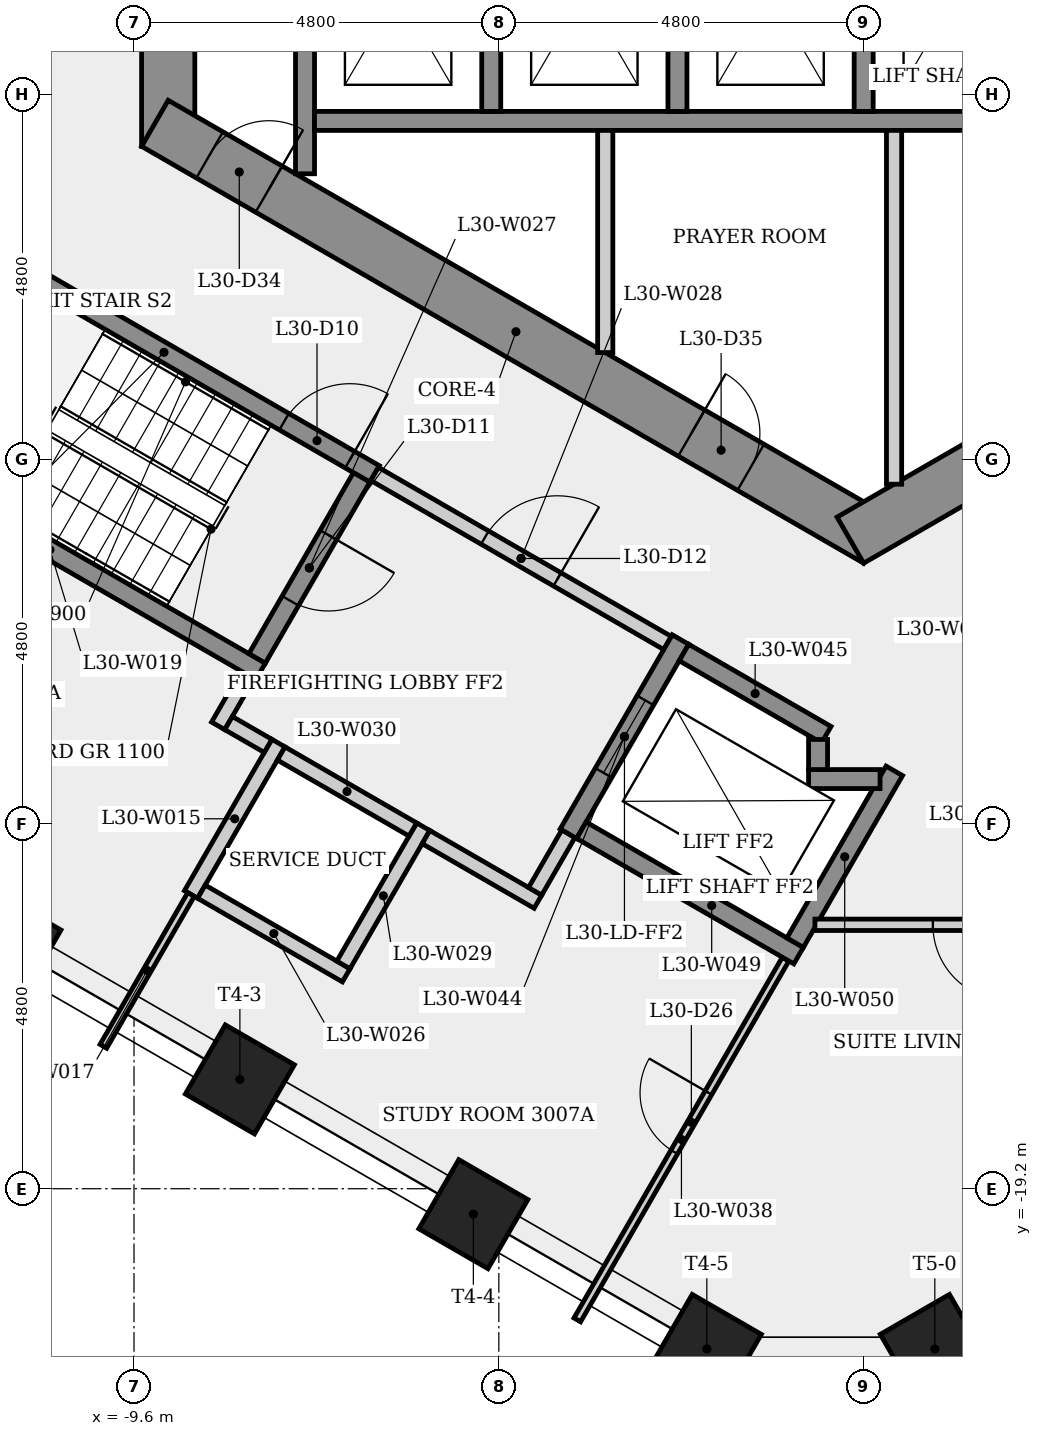
"""IFC4 building model, lengths in metres.
Left out: names, types, materials, properties, quantities, classifications, styles, units other than length and angle.
Written with IfcOpenShell. Run it as: python <this file> out.ifc"""

import sys

from ifc_helpers import new_model, si_unit, direction, frame, frame_2d, origin, origin_2d, place, context, subcontext, project, spatial, rectangle, extrude, element, fill, save


model = new_model("IFC4")
c1 = context("Model", 3, precision=1e-05, world=origin(), true_north=direction((0.0, 1.0)))
c2 = subcontext(c1, "Body", "Model", "MODEL_VIEW")
j1 = project(units=[si_unit("LENGTHUNIT", "METRE"), si_unit("PLANEANGLEUNIT", "RADIAN")], contexts=[c1])
p1 = place(None, origin())
s1 = spatial("IfcSite", under=j1, at=p1, CompositionType="ELEMENT")
p2 = place(p1, origin())
s2 = spatial("IfcBuilding", under=s1, at=p2, CompositionType="ELEMENT")
p3 = place(p2, frame((0.0, 0.0, 113.7)))
s3 = spatial("IfcBuildingStorey", under=s2, at=p3, CompositionType="ELEMENT", Elevation=113.7)
p4 = place(p3, frame((-9.15, 5.485, 0.0), z_axis=(0.0, 0.0, 1.0), x_axis=(0.0, -1.0, 0.0)))
e1 = element("IfcWall", 1, at=p4, inside=s3, PredefinedType="SHEAR", context=c2, shape_type="SweptSolid", body=[
    extrude(rectangle(XDim=10.97, YDim=0.7, at=frame_2d((5.485, 0.0))), origin(), (0.0, 0.0, 1.0), 3.4),
])
p5 = place(p4, frame((4.685, 0.0, 0.0)))
e2 = element("IfcOpeningElement", 2, at=p5, cuts=e1, PredefinedType="OPENING", context=c2, shape_type="SweptSolid", body=[
    extrude(rectangle(XDim=1.6, YDim=2.1, at=frame_2d((0.8, 1.05))), frame((0.0, 0.36, 0.0), z_axis=(0.0, -1.0, 0.0), x_axis=(1.0, 0.0, 0.0)), (0.0, 0.0, 1.0), 0.72),
])
p6 = place(p3, frame((-9.325, -5.182, 0.0), z_axis=(0.0, 0.0, 1.0), x_axis=(0.866023993627, -0.500002442456, 0.0)))
e3 = element("IfcWall", 3, at=p6, inside=s3, PredefinedType="SHEAR", context=c2, shape_type="SweptSolid", body=[
    extrude(rectangle(XDim=10.97, YDim=0.7, at=frame_2d((5.485, 0.0))), origin(), (0.0, 0.0, 1.0), 3.4),
])
p7 = place(p6, frame((0.832, 0.0, 0.0)))
e4 = element("IfcOpeningElement", 4, at=p7, cuts=e3, PredefinedType="OPENING", context=c2, shape_type="SweptSolid", body=[
    extrude(rectangle(XDim=0.9, YDim=2.1, at=frame_2d((0.45, 1.05))), frame((0.0, 0.36, 0.0), z_axis=(0.0, -1.0, 0.0), x_axis=(1.0, 0.0, 0.0)), (0.0, 0.0, 1.0), 0.72),
])
p8 = place(p6, frame((8.152, 0.0, 0.0)))
e5 = element("IfcOpeningElement", 5, at=p8, cuts=e3, PredefinedType="OPENING", context=c2, shape_type="SweptSolid", body=[
    extrude(rectangle(XDim=0.9, YDim=2.1, at=frame_2d((0.45, 1.05))), frame((0.0, 0.36, 0.0), z_axis=(0.0, -1.0, 0.0), x_axis=(1.0, 0.0, 0.0)), (0.0, 0.0, 1.0), 0.72),
])
p9 = place(p3, frame((-0.175, -10.667, 0.0), z_axis=(0.0, 0.0, 1.0), x_axis=(0.866023993627, 0.500002442456, 0.0)))
e6 = element("IfcWall", 6, at=p9, inside=s3, PredefinedType="SHEAR", context=c2, shape_type="SweptSolid", body=[
    extrude(rectangle(XDim=10.97, YDim=0.7, at=frame_2d((5.485, 0.0))), origin(), (0.0, 0.0, 1.0), 3.4),
])
p10 = place(p9, frame((6.906, 0.0, 0.0)))
e7 = element("IfcOpeningElement", 7, at=p10, cuts=e6, PredefinedType="OPENING", context=c2, shape_type="SweptSolid", body=[
    extrude(rectangle(XDim=0.9, YDim=2.1, at=frame_2d((0.45, 1.05))), frame((0.0, 0.36, 0.0), z_axis=(0.0, -1.0, 0.0), x_axis=(1.0, 0.0, 0.0)), (0.0, 0.0, 1.0), 0.72),
])
for number, where, z_axis, x_axis in (
    (8, (-11.279, -15.988, 0.0), (0.0, 0.0, 1.0), (-0.5, -0.866, 0.0)),
    (9, (-8.207, -17.762, 0.0), (0.0, 0.0, 1.0), (-0.5, -0.866, 0.0)),
    (10, (-5.135, -19.535, 0.0), (0.0, 0.0, 1.0), (-0.5, -0.866, 0.0)),
    (11, (-2.064, -21.308, 0.0), (0.0, 0.0, 1.0), (-0.5, -0.866, 0.0)),
    (12, (0.936, -21.308, 0.0), (0.0, 0.0, 1.0), (0.5, -0.866, 0.0)),
):
    element("IfcColumn", number, at=place(p3, frame(where, z_axis=z_axis, x_axis=x_axis)), inside=s3, PredefinedType="COLUMN", context=c2, shape_type="SweptSolid", body=[
        extrude(rectangle(XDim=1.05, YDim=1.05, at=origin_2d()), origin(), (0.0, 0.0, 1.0), 3.4),
    ])
p11 = place(p3, frame((-11.977, -6.595, 0.0), z_axis=(0.0, 0.0, 1.0), x_axis=(0.866025499775, -0.499999833739, 0.0)))
e13 = element("IfcWall", 13, at=p11, inside=s3, PredefinedType="SHEAR", context=c2, shape_type="SweptSolid", body=[
    extrude(rectangle(XDim=6.4, YDim=0.25, at=frame_2d((3.2, 0.0))), origin(), (0.0, 0.0, 1.0), 3.05),
])
p12 = place(p11, frame((5.025, 0.0, 0.0)))
e14 = element("IfcOpeningElement", 14, at=p12, cuts=e13, PredefinedType="OPENING", context=c2, shape_type="SweptSolid", body=[
    extrude(rectangle(XDim=1.0, YDim=2.1, at=frame_2d((0.5, 1.05))), frame((0.0, 0.135, 0.0), z_axis=(0.0, -1.0, 0.0), x_axis=(1.0, 0.0, 0.0)), (0.0, 0.0, 1.0), 0.27),
])
p13 = place(p3, frame((-8.85, -15.329, 0.0), z_axis=(0.0, 0.0, 1.0), x_axis=(0.500077740698, 0.865980515519, 0.0)))
e15 = element("IfcWall", 15, at=p13, inside=s3, PredefinedType="PLUMBINGWALL", context=c2, shape_type="SweptSolid", body=[
    extrude(rectangle(XDim=2.3, YDim=0.2, at=frame_2d((1.15, 0.0))), origin(), (0.0, 0.0, 1.0), 3.05),
])
p14 = place(p3, frame((-8.85, -15.329, 0.0), z_axis=(0.0, 0.0, 1.0), x_axis=(-0.500009533716, -0.866019899421, 0.0)))
e16 = element("IfcWall", 16, at=p14, inside=s3, PredefinedType="PARTITIONING", context=c2, shape_type="SweptSolid", body=[
    extrude(rectangle(XDim=2.307, YDim=0.1, at=frame_2d((1.153, 0.0))), origin(), (0.0, 0.0, 1.0), 3.05),
])
p15 = place(p3, frame((-8.493, -13.11, 0.0), z_axis=(0.0, 0.0, 1.0), x_axis=(0.500067724834, 0.865986299303, 0.0)))
e17 = element("IfcWall", 17, at=p15, inside=s3, PredefinedType="PARTITIONING", context=c2, shape_type="SweptSolid", body=[
    extrude(rectangle(XDim=0.775, YDim=0.2, at=frame_2d((0.388, 0.0))), origin(), (0.0, 0.0, 1.0), 3.05),
])
p16 = place(p3, frame((-7.935, -12.393, 0.0), z_axis=(0.0, 0.0, 1.0), x_axis=(-0.866025499775, 0.499999833739, 0.0)))
e18 = element("IfcWall", 18, at=p16, inside=s3, PredefinedType="SHEAR", context=c2, shape_type="SweptSolid", body=[
    extrude(rectangle(XDim=6.4, YDim=0.25, at=frame_2d((3.2, 0.0))), origin(), (0.0, 0.0, 1.0), 3.05),
])
p17 = place(p3, frame((-7.836, -13.373, 0.0), z_axis=(0.0, 0.0, 1.0), x_axis=(-0.866232998003, 0.499640263761, 0.0)))
e19 = element("IfcWall", 19, at=p17, inside=s3, PredefinedType="PARTITIONING", context=c2, shape_type="SweptSolid", body=[
    extrude(rectangle(XDim=0.6, YDim=0.2, at=frame_2d((0.3, 0.0))), origin(), (0.0, 0.0, 1.0), 3.05),
])
p18 = place(p3, frame((-7.35, -5.846, 0.0), z_axis=(0.0, 0.0, 1.0), x_axis=(0.0, 1.0, 0.0)))
e20 = element("IfcWall", 20, at=p18, inside=s3, PredefinedType="SHEAR", context=c2, shape_type="SweptSolid", body=[
    extrude(rectangle(XDim=4.171, YDim=0.25, at=frame_2d((2.085, 0.0))), origin(), (0.0, 0.0, 1.0), 3.05),
])
p19 = place(p3, frame((-6.808, -16.392, 0.0), z_axis=(0.0, 0.0, 1.0), x_axis=(-0.866008176907, 0.50002983664, 0.0)))
e21 = element("IfcWall", 21, at=p19, inside=s3, PredefinedType="PLUMBINGWALL", context=c2, shape_type="SweptSolid", body=[
    extrude(rectangle(XDim=2.2, YDim=0.2, at=frame_2d((1.1, 0.0))), origin(), (0.0, 0.0, 1.0), 3.05),
])
p20 = place(p3, frame((-6.605, -9.841, 0.0), z_axis=(0.0, 0.0, 1.0), x_axis=(-0.499996545922, -0.866027397988, 0.0)))
e22 = element("IfcWall", 22, at=p20, inside=s3, PredefinedType="SHEAR", context=c2, shape_type="SweptSolid", body=[
    extrude(rectangle(XDim=2.75, YDim=0.25, at=frame_2d((1.375, 0.0))), origin(), (0.0, 0.0, 1.0), 3.05),
])
p21 = place(p20, frame((0.875, 0.0, 0.0)))
e23 = element("IfcOpeningElement", 23, at=p21, cuts=e22, PredefinedType="OPENING", context=c2, shape_type="SweptSolid", body=[
    extrude(rectangle(XDim=1.0, YDim=2.1, at=frame_2d((0.5, 1.05))), frame((0.0, 0.135, 0.0), z_axis=(0.0, -1.0, 0.0), x_axis=(1.0, 0.0, 0.0)), (0.0, 0.0, 1.0), 0.27),
])
p22 = place(p3, frame((-6.435, -9.795, 0.0), z_axis=(0.0, 0.0, 1.0), x_axis=(0.866012907634, -0.500021643343, 0.0)))
e24 = element("IfcWall", 24, at=p22, inside=s3, PredefinedType="PARTITIONING", context=c2, shape_type="SweptSolid", body=[
    extrude(rectangle(XDim=4.45, YDim=0.2, at=frame_2d((2.225, 0.0))), origin(), (0.0, 0.0, 1.0), 3.05),
])
p23 = place(p22, frame((1.675, 0.0, 0.0)))
e25 = element("IfcOpeningElement", 25, at=p23, cuts=e24, PredefinedType="OPENING", context=c2, shape_type="SweptSolid", body=[
    extrude(rectangle(XDim=1.1, YDim=2.1, at=frame_2d((0.55, 1.05))), frame((0.0, 0.11, 0.0), z_axis=(0.0, -1.0, 0.0), x_axis=(1.0, 0.0, 0.0)), (0.0, 0.0, 1.0), 0.22),
])
p24 = place(p3, frame((-5.795, -14.437, 0.0), z_axis=(0.0, 0.0, 1.0), x_axis=(-0.500027713859, -0.866009402589, 0.0)))
e26 = element("IfcWall", 26, at=p24, inside=s3, PredefinedType="PLUMBINGWALL", context=c2, shape_type="SweptSolid", body=[
    extrude(rectangle(XDim=2.1, YDim=0.2, at=frame_2d((1.05, 0.0))), origin(), (0.0, 0.0, 1.0), 3.05),
])
p25 = place(p3, frame((-5.931, -14.473, 0.0), z_axis=(0.0, 0.0, 1.0), x_axis=(-0.866041268327, 0.499972520799, 0.0)))
e27 = element("IfcWall", 27, at=p25, inside=s3, PredefinedType="PLUMBINGWALL", context=c2, shape_type="SweptSolid", body=[
    extrude(rectangle(XDim=2.0, YDim=0.2, at=frame_2d((1.0, 0.0))), origin(), (0.0, 0.0, 1.0), 3.05),
])
p26 = place(p3, frame((-7.225, -5.15, 0.0), z_axis=(0.0, 0.0, 1.0), x_axis=(1.0, 0.0, 0.0)))
e28 = element("IfcWall", 28, at=p26, inside=s3, PredefinedType="SHEAR", context=c2, shape_type="SweptSolid", body=[
    extrude(rectangle(XDim=14.7, YDim=0.25, at=frame_2d((7.35, 0.0))), origin(), (0.0, 0.0, 1.0), 3.05),
])
p27 = place(p3, frame((-4.9, -1.925, 0.0), z_axis=(0.0, 0.0, 1.0), x_axis=(0.0, -1.0, 0.0)))
e29 = element("IfcWall", 29, at=p27, inside=s3, PredefinedType="SHEAR", context=c2, shape_type="SweptSolid", body=[
    extrude(rectangle(XDim=3.1, YDim=0.25, at=frame_2d((1.55, 0.0))), origin(), (0.0, 0.0, 1.0), 3.4),
])
p28 = place(p3, frame((-4.286, -15.423, 0.0), z_axis=(0.0, 0.0, 1.0), x_axis=(-0.866025371046, 0.500000056704, 0.0)))
e30 = element("IfcWall", 30, at=p28, inside=s3, PredefinedType="PARTITIONING", context=c2, shape_type="SweptSolid", body=[
    extrude(rectangle(XDim=1.7, YDim=0.2, at=frame_2d((0.85, 0.0))), origin(), (0.0, 0.0, 1.0), 3.05),
])
p29 = place(p3, frame((-3.885, -14.529, 0.0), z_axis=(0.0, 0.0, 1.0), x_axis=(-0.499859285417, -0.866106630146, 0.0)))
e31 = element("IfcWall", 31, at=p29, inside=s3, PredefinedType="PARTITIONING", context=c2, shape_type="SweptSolid", body=[
    extrude(rectangle(XDim=0.875, YDim=0.2, at=frame_2d((0.438, 0.0))), origin(), (0.0, 0.0, 1.0), 3.05),
])
p30 = place(p3, frame((-3.768, -20.926, 0.0), z_axis=(0.0, 0.0, 1.0), x_axis=(0.499980760091, 0.866036511666, 0.0)))
e32 = element("IfcWall", 32, at=p30, inside=s3, PredefinedType="PARTITIONING", context=c2, shape_type="SweptSolid", body=[
    extrude(rectangle(XDim=5.482, YDim=0.1, at=frame_2d((2.741, 0.0))), origin(), (0.0, 0.0, 1.0), 3.05),
])
p31 = place(p30, frame((2.551, 0.0, 0.0)))
e33 = element("IfcOpeningElement", 33, at=p31, cuts=e32, PredefinedType="OPENING", context=c2, shape_type="SweptSolid", body=[
    extrude(rectangle(XDim=0.9, YDim=2.1, at=frame_2d((0.45, 1.05))), frame((0.0, 0.06, 0.0), z_axis=(0.0, -1.0, 0.0), x_axis=(1.0, 0.0, 0.0)), (0.0, 0.0, 1.0), 0.12),
])
p32 = place(p3, frame((-3.4, -5.275, 0.0), z_axis=(0.0, 0.0, 1.0), x_axis=(0.0, -1.0, 0.0)))
e34 = element("IfcWall", 34, at=p32, inside=s3, PredefinedType="PARTITIONING", context=c2, shape_type="SweptSolid", body=[
    extrude(rectangle(XDim=2.924, YDim=0.2, at=frame_2d((1.462, 0.0))), origin(), (0.0, 0.0, 1.0), 3.05),
])
p33 = place(p3, frame((-2.41, -11.974, 0.0), z_axis=(0.0, 0.0, 1.0), x_axis=(-0.500001826776, -0.866024349092, 0.0)))
e35 = element("IfcWall", 35, at=p33, inside=s3, PredefinedType="SHEAR", context=c2, shape_type="SweptSolid", body=[
    extrude(rectangle(XDim=2.95, YDim=0.25, at=frame_2d((1.475, 0.0))), origin(), (0.0, 0.0, 1.0), 3.05),
])
p34 = place(p33, frame((0.925, 0.0, 0.0)))
e36 = element("IfcOpeningElement", 36, at=p34, cuts=e35, PredefinedType="OPENING", context=c2, shape_type="SweptSolid", body=[
    extrude(rectangle(XDim=1.1, YDim=2.1, at=frame_2d((0.55, 1.05))), frame((0.0, 0.135, 0.0), z_axis=(0.0, -1.0, 0.0), x_axis=(1.0, 0.0, 0.0)), (0.0, 0.0, 1.0), 0.27),
])
p35 = place(p3, frame((-2.364, -12.145, 0.0), z_axis=(0.0, 0.0, 1.0), x_axis=(0.86603892542, -0.499976579108, 0.0)))
e37 = element("IfcWall", 37, at=p35, inside=s3, PredefinedType="SHEAR", context=c2, shape_type="SweptSolid", body=[
    extrude(rectangle(XDim=2.162, YDim=0.25, at=frame_2d((1.081, 0.0))), origin(), (0.0, 0.0, 1.0), 3.05),
])
p36 = place(p3, frame((-2.45, -1.925, 0.0), z_axis=(0.0, 0.0, 1.0), x_axis=(0.0, -1.0, 0.0)))
e38 = element("IfcWall", 38, at=p36, inside=s3, PredefinedType="SHEAR", context=c2, shape_type="SweptSolid", body=[
    extrude(rectangle(XDim=3.1, YDim=0.25, at=frame_2d((1.55, 0.0))), origin(), (0.0, 0.0, 1.0), 3.4),
])
p37 = place(p3, frame((-0.856, -16.133, 0.0), z_axis=(0.0, 0.0, 1.0), x_axis=(-0.866021716278, 0.500006386895, 0.0)))
e39 = element("IfcWall", 39, at=p37, inside=s3, PredefinedType="SHEAR", context=c2, shape_type="SweptSolid", body=[
    extrude(rectangle(XDim=3.3, YDim=0.25, at=frame_2d((1.65, 0.0))), origin(), (0.0, 0.0, 1.0), 3.05),
])
p38 = place(p3, frame((-0.902, -15.962, 0.0), z_axis=(0.0, 0.0, 1.0), x_axis=(0.499981517636, 0.866036074319, 0.0)))
e40 = element("IfcWall", 40, at=p38, inside=s3, PredefinedType="SHEAR", context=c2, shape_type="SweptSolid", body=[
    extrude(rectangle(XDim=2.61, YDim=0.25, at=frame_2d((1.305, 0.0))), origin(), (0.0, 0.0, 1.0), 3.05),
])
p39 = place(p3, frame((-0.725, -13.81, 0.0), z_axis=(0.0, 0.0, 1.0), x_axis=(1.0, 0.0, 0.0)))
e41 = element("IfcWall", 41, at=p39, inside=s3, PredefinedType="SHEAR", context=c2, shape_type="SweptSolid", body=[
    extrude(rectangle(XDim=0.941, YDim=0.25, at=frame_2d((0.47, 0.0))), origin(), (0.0, 0.0, 1.0), 3.4),
])
p40 = place(p3, frame((-0.6, -13.289, 0.0), z_axis=(0.0, 0.0, 1.0), x_axis=(0.0, -1.0, 0.0)))
e42 = element("IfcWall", 42, at=p40, inside=s3, PredefinedType="SHEAR", context=c2, shape_type="SweptSolid", body=[
    extrude(rectangle(XDim=0.396, YDim=0.25, at=frame_2d((0.198, 0.0))), origin(), (0.0, 0.0, 1.0), 3.4),
])
p41 = place(p3, frame((0.0, -1.925, 0.0), z_axis=(0.0, 0.0, 1.0), x_axis=(0.0, -1.0, 0.0)))
e43 = element("IfcWall", 43, at=p41, inside=s3, PredefinedType="SHEAR", context=c2, shape_type="SweptSolid", body=[
    extrude(rectangle(XDim=3.1, YDim=0.25, at=frame_2d((1.55, 0.0))), origin(), (0.0, 0.0, 1.0), 3.4),
])
p42 = place(p3, frame((0.4, -5.275, 0.0), z_axis=(0.0, 0.0, 1.0), x_axis=(0.0, -1.0, 0.0)))
e44 = element("IfcWall", 44, at=p42, inside=s3, PredefinedType="PARTITIONING", context=c2, shape_type="SweptSolid", body=[
    extrude(rectangle(XDim=4.656, YDim=0.2, at=frame_2d((2.328, 0.0))), origin(), (0.0, 0.0, 1.0), 3.05),
])
p43 = place(p3, frame((3.463, -15.728, 0.0), z_axis=(0.0, 0.0, 1.0), x_axis=(-1.0, 0.0, 0.0)))
e45 = element("IfcWall", 45, at=p43, inside=s3, PredefinedType="PARTITIONING", context=c2, shape_type="SweptSolid", body=[
    extrude(rectangle(XDim=4.104, YDim=0.15, at=frame_2d((2.052, 0.0))), origin(), (0.0, 0.0, 1.0), 3.05),
])
p44 = place(p43, frame((1.552, 0.0, 0.0)))
e46 = element("IfcOpeningElement", 46, at=p44, cuts=e45, PredefinedType="OPENING", context=c2, shape_type="SweptSolid", body=[
    extrude(rectangle(XDim=1.0, YDim=2.1, at=frame_2d((0.5, 1.05))), frame((0.0, 0.085, 0.0), z_axis=(0.0, -1.0, 0.0), x_axis=(1.0, 0.0, 0.0)), (0.0, 0.0, 1.0), 0.17),
])
p45 = place(p12, origin())
e47 = element("IfcDoor", 47, at=p45, inside=s3, OperationType="SINGLE_SWING_RIGHT", PredefinedType="DOOR", context=c2, shape_type="SweptSolid", body=[
    extrude(rectangle(XDim=1.0, YDim=2.1, at=frame_2d((0.5, 1.05))), frame((0.0, 0.025, 0.0), z_axis=(0.0, -1.0, 0.0), x_axis=(1.0, 0.0, 0.0)), (0.0, 0.0, 1.0), 0.05),
])
fill(e14, e47)
p46 = place(p21, origin())
e48 = element("IfcDoor", 48, at=p46, inside=s3, OperationType="SINGLE_SWING_LEFT", PredefinedType="DOOR", context=c2, shape_type="SweptSolid", body=[
    extrude(rectangle(XDim=1.0, YDim=2.1, at=frame_2d((0.5, 1.05))), frame((0.0, 0.025, 0.0), z_axis=(0.0, -1.0, 0.0), x_axis=(1.0, 0.0, 0.0)), (0.0, 0.0, 1.0), 0.05),
])
fill(e23, e48)
p47 = place(p23, origin())
e49 = element("IfcDoor", 49, at=p47, inside=s3, OperationType="SINGLE_SWING_RIGHT", PredefinedType="DOOR", context=c2, shape_type="SweptSolid", body=[
    extrude(rectangle(XDim=1.1, YDim=2.1, at=frame_2d((0.55, 1.05))), frame((0.0, 0.025, 0.0), z_axis=(0.0, -1.0, 0.0), x_axis=(1.0, 0.0, 0.0)), (0.0, 0.0, 1.0), 0.05),
])
fill(e25, e49)
p48 = place(p34, origin())
e50 = element("IfcDoor", 50, at=p48, inside=s3, OperationType="SLIDING_TO_LEFT", PredefinedType="DOOR", context=c2, shape_type="SweptSolid", body=[
    extrude(rectangle(XDim=1.1, YDim=2.1, at=frame_2d((0.55, 1.05))), frame((0.0, 0.025, 0.0), z_axis=(0.0, -1.0, 0.0), x_axis=(1.0, 0.0, 0.0)), (0.0, 0.0, 1.0), 0.05),
])
fill(e36, e50)
p49 = place(p44, origin())
e51 = element("IfcDoor", 51, at=p49, inside=s3, OperationType="SINGLE_SWING_LEFT", PredefinedType="DOOR", context=c2, shape_type="SweptSolid", body=[
    extrude(rectangle(XDim=1.0, YDim=2.1, at=frame_2d((0.5, 1.05))), frame((0.0, 0.025, 0.0), z_axis=(0.0, -1.0, 0.0), x_axis=(1.0, 0.0, 0.0)), (0.0, 0.0, 1.0), 0.05),
])
fill(e46, e51)
p50 = place(p31, origin())
e52 = element("IfcDoor", 52, at=p50, inside=s3, OperationType="SINGLE_SWING_RIGHT", PredefinedType="DOOR", context=c2, shape_type="SweptSolid", body=[
    extrude(rectangle(XDim=0.9, YDim=2.1, at=frame_2d((0.45, 1.05))), frame((0.0, 0.025, 0.0), z_axis=(0.0, -1.0, 0.0), x_axis=(1.0, 0.0, 0.0)), (0.0, 0.0, 1.0), 0.05),
])
fill(e33, e52)
p51 = place(p7, origin())
e53 = element("IfcDoor", 53, at=p51, inside=s3, OperationType="SINGLE_SWING_RIGHT", PredefinedType="DOOR", context=c2, shape_type="SweptSolid", body=[
    extrude(rectangle(XDim=0.9, YDim=2.1, at=frame_2d((0.45, 1.05))), frame((0.0, 0.025, 0.0), z_axis=(0.0, -1.0, 0.0), x_axis=(1.0, 0.0, 0.0)), (0.0, 0.0, 1.0), 0.05),
])
fill(e4, e53)
p52 = place(p8, origin())
e54 = element("IfcDoor", 54, at=p52, inside=s3, OperationType="SINGLE_SWING_LEFT", PredefinedType="DOOR", context=c2, shape_type="SweptSolid", body=[
    extrude(rectangle(XDim=0.9, YDim=2.1, at=frame_2d((0.45, 1.05))), frame((0.0, 0.025, 0.0), z_axis=(0.0, -1.0, 0.0), x_axis=(1.0, 0.0, 0.0)), (0.0, 0.0, 1.0), 0.05),
])
fill(e5, e54)
save(model, sys.argv[1])
